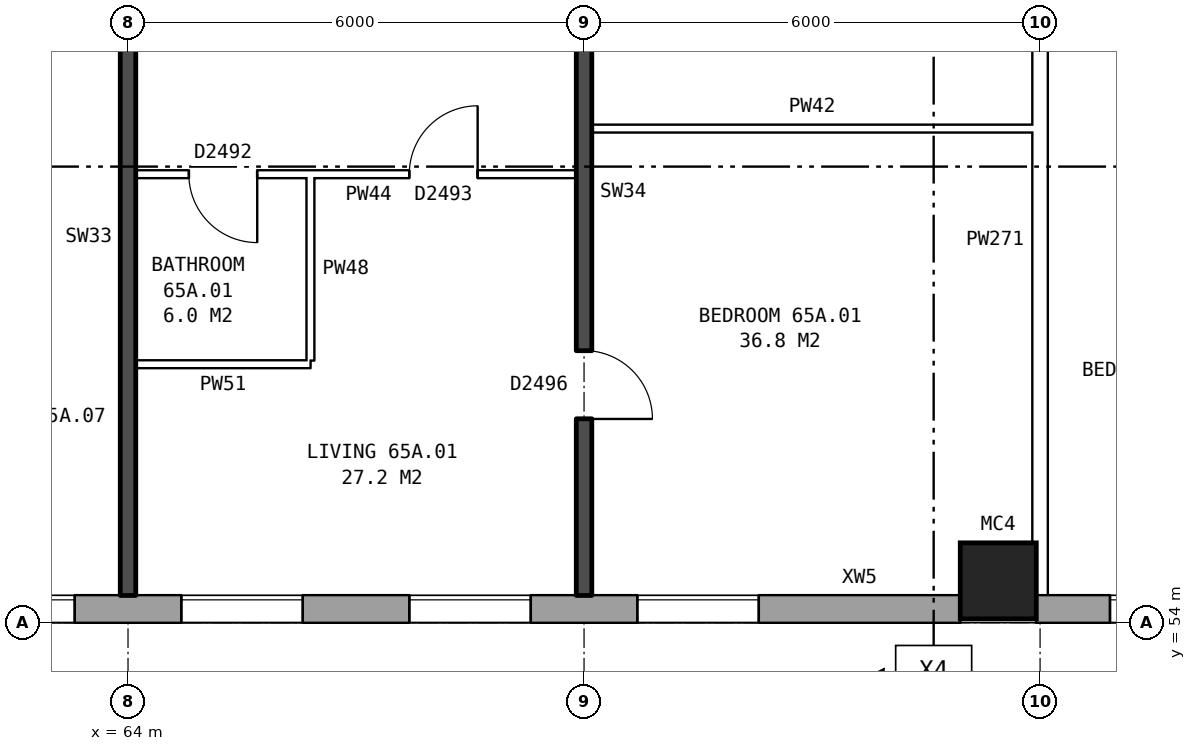
"""IFC4 building model, lengths in metres.
Left out: names, types, materials, properties, quantities, classifications, styles, units other than length and angle.
Written with IfcOpenShell. Run it as: python <this file> out.ifc"""

import sys

from ifc_helpers import new_model, si_unit, direction, frame, frame_2d, origin, origin_2d, place, context, subcontext, project, spatial, rectangle, hollow_rectangle, extrude, element, fill, save


model = new_model("IFC4")
c1 = context("Model", 3, precision=1e-05, world=origin(), true_north=direction((0.0, 1.0)))
c2 = subcontext(c1, "Body", "Model", "MODEL_VIEW")
j1 = project(units=[si_unit("LENGTHUNIT", "METRE"), si_unit("PLANEANGLEUNIT", "RADIAN")], contexts=[c1])
p1 = place(None, origin())
s1 = spatial("IfcSite", under=j1, at=p1, CompositionType="ELEMENT")
p2 = place(p1, origin())
s2 = spatial("IfcBuilding", under=s1, at=p2, CompositionType="ELEMENT")
p3 = place(p2, frame((0.0, 0.0, 230.7)))
s3 = spatial("IfcBuildingStorey", under=s2, at=p3, CompositionType="ELEMENT", Elevation=230.7)
p4 = place(p3, frame((75.45, 54.55, 0.0), z_axis=(0.0, 0.0, 1.0), x_axis=(1.0, 0.0, 0.0)))
e1 = element("IfcColumn", 1, at=p4, inside=s3, PredefinedType="COLUMN", context=c2, shape_type="SweptSolid", body=[
    extrude(hollow_rectangle(XDim=1.0, YDim=1.0, WallThickness=0.055, at=origin_2d()), origin(), (0.0, 0.0, 1.0), 3.1),
])
p5 = place(p3, frame((35.075, 54.18, 0.0), z_axis=(0.0, 0.0, 1.0), x_axis=(1.0, 0.0, 0.0)))
e2 = element("IfcWall", 2, at=p5, inside=s3, PredefinedType="STANDARD", context=c2, shape_type="SweptSolid", body=[
    extrude(rectangle(XDim=39.875, YDim=0.36, at=frame_2d((19.938, 0.0))), origin(), (0.0, 0.0, 1.0), 2.85),
])
p6 = place(p5, frame((2.625, 0.0, 0.8)))
e3 = element("IfcOpeningElement", 3, at=p6, cuts=e2, PredefinedType="OPENING", context=c2, shape_type="SweptSolid", body=[
    extrude(rectangle(XDim=1.6, YDim=1.8, at=frame_2d((0.8, 0.9))), frame((0.0, 0.19, 0.0), z_axis=(0.0, -1.0, 0.0), x_axis=(1.0, 0.0, 0.0)), (0.0, 0.0, 1.0), 0.38),
])
p7 = place(p5, frame((5.625, 0.0, 0.8)))
e4 = element("IfcOpeningElement", 4, at=p7, cuts=e2, PredefinedType="OPENING", context=c2, shape_type="SweptSolid", body=[
    extrude(rectangle(XDim=1.6, YDim=1.8, at=frame_2d((0.8, 0.9))), frame((0.0, 0.19, 0.0), z_axis=(0.0, -1.0, 0.0), x_axis=(1.0, 0.0, 0.0)), (0.0, 0.0, 1.0), 0.38),
])
p8 = place(p5, frame((8.625, 0.0, 0.8)))
e5 = element("IfcOpeningElement", 5, at=p8, cuts=e2, PredefinedType="OPENING", context=c2, shape_type="SweptSolid", body=[
    extrude(rectangle(XDim=1.6, YDim=1.8, at=frame_2d((0.8, 0.9))), frame((0.0, 0.19, 0.0), z_axis=(0.0, -1.0, 0.0), x_axis=(1.0, 0.0, 0.0)), (0.0, 0.0, 1.0), 0.38),
])
p9 = place(p5, frame((11.625, 0.0, 0.8)))
e6 = element("IfcOpeningElement", 6, at=p9, cuts=e2, PredefinedType="OPENING", context=c2, shape_type="SweptSolid", body=[
    extrude(rectangle(XDim=1.6, YDim=1.8, at=frame_2d((0.8, 0.9))), frame((0.0, 0.19, 0.0), z_axis=(0.0, -1.0, 0.0), x_axis=(1.0, 0.0, 0.0)), (0.0, 0.0, 1.0), 0.38),
])
p10 = place(p5, frame((14.075, 0.0, 0.8)))
e7 = element("IfcOpeningElement", 7, at=p10, cuts=e2, PredefinedType="OPENING", context=c2, shape_type="SweptSolid", body=[
    extrude(rectangle(XDim=1.0, YDim=1.8, at=frame_2d((0.5, 0.9))), frame((0.0, 0.19, 0.0), z_axis=(0.0, -1.0, 0.0), x_axis=(1.0, 0.0, 0.0)), (0.0, 0.0, 1.0), 0.38),
])
p11 = place(p5, frame((17.625, 0.0, 0.8)))
e8 = element("IfcOpeningElement", 8, at=p11, cuts=e2, PredefinedType="OPENING", context=c2, shape_type="SweptSolid", body=[
    extrude(rectangle(XDim=1.6, YDim=1.8, at=frame_2d((0.8, 0.9))), frame((0.0, 0.19, 0.0), z_axis=(0.0, -1.0, 0.0), x_axis=(1.0, 0.0, 0.0)), (0.0, 0.0, 1.0), 0.38),
])
p12 = place(p5, frame((20.125, 0.0, 0.8)))
e9 = element("IfcOpeningElement", 9, at=p12, cuts=e2, PredefinedType="OPENING", context=c2, shape_type="SweptSolid", body=[
    extrude(rectangle(XDim=0.6, YDim=1.2, at=frame_2d((0.3, 0.6))), frame((0.0, 0.19, 0.0), z_axis=(0.0, -1.0, 0.0), x_axis=(1.0, 0.0, 0.0)), (0.0, 0.0, 1.0), 0.38),
])
p13 = place(p5, frame((23.625, 0.0, 0.8)))
e10 = element("IfcOpeningElement", 10, at=p13, cuts=e2, PredefinedType="OPENING", context=c2, shape_type="SweptSolid", body=[
    extrude(rectangle(XDim=1.6, YDim=1.8, at=frame_2d((0.8, 0.9))), frame((0.0, 0.19, 0.0), z_axis=(0.0, -1.0, 0.0), x_axis=(1.0, 0.0, 0.0)), (0.0, 0.0, 1.0), 0.38),
])
p14 = place(p5, frame((26.625, 0.0, 0.8)))
e11 = element("IfcOpeningElement", 11, at=p14, cuts=e2, PredefinedType="OPENING", context=c2, shape_type="SweptSolid", body=[
    extrude(rectangle(XDim=1.6, YDim=1.8, at=frame_2d((0.8, 0.9))), frame((0.0, 0.19, 0.0), z_axis=(0.0, -1.0, 0.0), x_axis=(1.0, 0.0, 0.0)), (0.0, 0.0, 1.0), 0.38),
])
p15 = place(p5, frame((29.625, 0.0, 0.8)))
e12 = element("IfcOpeningElement", 12, at=p15, cuts=e2, PredefinedType="OPENING", context=c2, shape_type="SweptSolid", body=[
    extrude(rectangle(XDim=1.6, YDim=1.8, at=frame_2d((0.8, 0.9))), frame((0.0, 0.19, 0.0), z_axis=(0.0, -1.0, 0.0), x_axis=(1.0, 0.0, 0.0)), (0.0, 0.0, 1.0), 0.38),
])
p16 = place(p5, frame((32.625, 0.0, 0.8)))
e13 = element("IfcOpeningElement", 13, at=p16, cuts=e2, PredefinedType="OPENING", context=c2, shape_type="SweptSolid", body=[
    extrude(rectangle(XDim=1.6, YDim=1.8, at=frame_2d((0.8, 0.9))), frame((0.0, 0.19, 0.0), z_axis=(0.0, -1.0, 0.0), x_axis=(1.0, 0.0, 0.0)), (0.0, 0.0, 1.0), 0.38),
])
p17 = place(p5, frame((35.625, 0.0, 0.8)))
e14 = element("IfcOpeningElement", 14, at=p17, cuts=e2, PredefinedType="OPENING", context=c2, shape_type="SweptSolid", body=[
    extrude(rectangle(XDim=1.6, YDim=1.8, at=frame_2d((0.8, 0.9))), frame((0.0, 0.19, 0.0), z_axis=(0.0, -1.0, 0.0), x_axis=(1.0, 0.0, 0.0)), (0.0, 0.0, 1.0), 0.38),
])
p18 = place(p5, frame((22.125, 0.0, 1.7)))
e15 = element("IfcOpeningElement", 15, at=p18, cuts=e2, PredefinedType="OPENING", context=c2, shape_type="SweptSolid", body=[
    extrude(rectangle(XDim=0.6, YDim=0.9, at=frame_2d((0.3, 0.45))), frame((0.0, 0.19, 0.0), z_axis=(0.0, -1.0, 0.0), x_axis=(1.0, 0.0, 0.0)), (0.0, 0.0, 1.0), 0.38),
])
p19 = place(p3, frame((75.95, 54.18, 0.0), z_axis=(0.0, 0.0, 1.0), x_axis=(1.0, 0.0, 0.0)))
e16 = element("IfcWall", 16, at=p19, inside=s3, PredefinedType="STANDARD", context=c2, shape_type="SweptSolid", body=[
    extrude(rectangle(XDim=55.1, YDim=0.36, at=frame_2d((27.55, 0.0))), origin(), (0.0, 0.0, 1.0), 2.85),
])
p20 = place(p19, frame((0.969, 0.0, 0.8)))
e17 = element("IfcOpeningElement", 17, at=p20, cuts=e16, PredefinedType="OPENING", context=c2, shape_type="SweptSolid", body=[
    extrude(rectangle(XDim=1.6, YDim=1.8, at=frame_2d((0.8, 0.9))), frame((0.0, 0.19, 0.0), z_axis=(0.0, -1.0, 0.0), x_axis=(1.0, 0.0, 0.0)), (0.0, 0.0, 1.0), 0.38),
])
p21 = place(p19, frame((4.406, 0.0, 0.8)))
e18 = element("IfcOpeningElement", 18, at=p21, cuts=e16, PredefinedType="OPENING", context=c2, shape_type="SweptSolid", body=[
    extrude(rectangle(XDim=1.6, YDim=1.8, at=frame_2d((0.8, 0.9))), frame((0.0, 0.19, 0.0), z_axis=(0.0, -1.0, 0.0), x_axis=(1.0, 0.0, 0.0)), (0.0, 0.0, 1.0), 0.38),
])
p22 = place(p19, frame((7.844, 0.0, 0.8)))
e19 = element("IfcOpeningElement", 19, at=p22, cuts=e16, PredefinedType="OPENING", context=c2, shape_type="SweptSolid", body=[
    extrude(rectangle(XDim=1.6, YDim=1.8, at=frame_2d((0.8, 0.9))), frame((0.0, 0.19, 0.0), z_axis=(0.0, -1.0, 0.0), x_axis=(1.0, 0.0, 0.0)), (0.0, 0.0, 1.0), 0.38),
])
p23 = place(p19, frame((11.281, 0.0, 0.8)))
e20 = element("IfcOpeningElement", 20, at=p23, cuts=e16, PredefinedType="OPENING", context=c2, shape_type="SweptSolid", body=[
    extrude(rectangle(XDim=1.6, YDim=1.8, at=frame_2d((0.8, 0.9))), frame((0.0, 0.19, 0.0), z_axis=(0.0, -1.0, 0.0), x_axis=(1.0, 0.0, 0.0)), (0.0, 0.0, 1.0), 0.38),
])
p24 = place(p19, frame((14.719, 0.0, 0.8)))
e21 = element("IfcOpeningElement", 21, at=p24, cuts=e16, PredefinedType="OPENING", context=c2, shape_type="SweptSolid", body=[
    extrude(rectangle(XDim=1.6, YDim=1.8, at=frame_2d((0.8, 0.9))), frame((0.0, 0.19, 0.0), z_axis=(0.0, -1.0, 0.0), x_axis=(1.0, 0.0, 0.0)), (0.0, 0.0, 1.0), 0.38),
])
p25 = place(p19, frame((18.156, 0.0, 0.8)))
e22 = element("IfcOpeningElement", 22, at=p25, cuts=e16, PredefinedType="OPENING", context=c2, shape_type="SweptSolid", body=[
    extrude(rectangle(XDim=1.6, YDim=1.8, at=frame_2d((0.8, 0.9))), frame((0.0, 0.19, 0.0), z_axis=(0.0, -1.0, 0.0), x_axis=(1.0, 0.0, 0.0)), (0.0, 0.0, 1.0), 0.38),
])
p26 = place(p19, frame((21.594, 0.0, 0.8)))
e23 = element("IfcOpeningElement", 23, at=p26, cuts=e16, PredefinedType="OPENING", context=c2, shape_type="SweptSolid", body=[
    extrude(rectangle(XDim=1.6, YDim=1.8, at=frame_2d((0.8, 0.9))), frame((0.0, 0.19, 0.0), z_axis=(0.0, -1.0, 0.0), x_axis=(1.0, 0.0, 0.0)), (0.0, 0.0, 1.0), 0.38),
])
p27 = place(p19, frame((25.031, 0.0, 0.8)))
e24 = element("IfcOpeningElement", 24, at=p27, cuts=e16, PredefinedType="OPENING", context=c2, shape_type="SweptSolid", body=[
    extrude(rectangle(XDim=1.6, YDim=1.8, at=frame_2d((0.8, 0.9))), frame((0.0, 0.19, 0.0), z_axis=(0.0, -1.0, 0.0), x_axis=(1.0, 0.0, 0.0)), (0.0, 0.0, 1.0), 0.38),
])
p28 = place(p19, frame((28.469, 0.0, 0.8)))
e25 = element("IfcOpeningElement", 25, at=p28, cuts=e16, PredefinedType="OPENING", context=c2, shape_type="SweptSolid", body=[
    extrude(rectangle(XDim=1.6, YDim=1.8, at=frame_2d((0.8, 0.9))), frame((0.0, 0.19, 0.0), z_axis=(0.0, -1.0, 0.0), x_axis=(1.0, 0.0, 0.0)), (0.0, 0.0, 1.0), 0.38),
])
p29 = place(p19, frame((31.906, 0.0, 0.8)))
e26 = element("IfcOpeningElement", 26, at=p29, cuts=e16, PredefinedType="OPENING", context=c2, shape_type="SweptSolid", body=[
    extrude(rectangle(XDim=1.6, YDim=1.8, at=frame_2d((0.8, 0.9))), frame((0.0, 0.19, 0.0), z_axis=(0.0, -1.0, 0.0), x_axis=(1.0, 0.0, 0.0)), (0.0, 0.0, 1.0), 0.38),
])
p30 = place(p19, frame((35.344, 0.0, 0.8)))
e27 = element("IfcOpeningElement", 27, at=p30, cuts=e16, PredefinedType="OPENING", context=c2, shape_type="SweptSolid", body=[
    extrude(rectangle(XDim=1.6, YDim=1.8, at=frame_2d((0.8, 0.9))), frame((0.0, 0.19, 0.0), z_axis=(0.0, -1.0, 0.0), x_axis=(1.0, 0.0, 0.0)), (0.0, 0.0, 1.0), 0.38),
])
p31 = place(p19, frame((38.781, 0.0, 0.8)))
e28 = element("IfcOpeningElement", 28, at=p31, cuts=e16, PredefinedType="OPENING", context=c2, shape_type="SweptSolid", body=[
    extrude(rectangle(XDim=1.6, YDim=1.8, at=frame_2d((0.8, 0.9))), frame((0.0, 0.19, 0.0), z_axis=(0.0, -1.0, 0.0), x_axis=(1.0, 0.0, 0.0)), (0.0, 0.0, 1.0), 0.38),
])
p32 = place(p19, frame((42.219, 0.0, 0.8)))
e29 = element("IfcOpeningElement", 29, at=p32, cuts=e16, PredefinedType="OPENING", context=c2, shape_type="SweptSolid", body=[
    extrude(rectangle(XDim=1.6, YDim=1.8, at=frame_2d((0.8, 0.9))), frame((0.0, 0.19, 0.0), z_axis=(0.0, -1.0, 0.0), x_axis=(1.0, 0.0, 0.0)), (0.0, 0.0, 1.0), 0.38),
])
p33 = place(p19, frame((45.656, 0.0, 0.8)))
e30 = element("IfcOpeningElement", 30, at=p33, cuts=e16, PredefinedType="OPENING", context=c2, shape_type="SweptSolid", body=[
    extrude(rectangle(XDim=1.6, YDim=1.8, at=frame_2d((0.8, 0.9))), frame((0.0, 0.19, 0.0), z_axis=(0.0, -1.0, 0.0), x_axis=(1.0, 0.0, 0.0)), (0.0, 0.0, 1.0), 0.38),
])
p34 = place(p19, frame((49.094, 0.0, 0.8)))
e31 = element("IfcOpeningElement", 31, at=p34, cuts=e16, PredefinedType="OPENING", context=c2, shape_type="SweptSolid", body=[
    extrude(rectangle(XDim=1.6, YDim=1.8, at=frame_2d((0.8, 0.9))), frame((0.0, 0.19, 0.0), z_axis=(0.0, -1.0, 0.0), x_axis=(1.0, 0.0, 0.0)), (0.0, 0.0, 1.0), 0.38),
])
p35 = place(p19, frame((52.531, 0.0, 0.8)))
e32 = element("IfcOpeningElement", 32, at=p35, cuts=e16, PredefinedType="OPENING", context=c2, shape_type="SweptSolid", body=[
    extrude(rectangle(XDim=1.6, YDim=1.8, at=frame_2d((0.8, 0.9))), frame((0.0, 0.19, 0.0), z_axis=(0.0, -1.0, 0.0), x_axis=(1.0, 0.0, 0.0)), (0.0, 0.0, 1.0), 0.38),
])
p36 = place(p3, frame((64.1, 57.4, 0.0), z_axis=(0.0, 0.0, 1.0), x_axis=(1.0, 0.0, 0.0)))
e33 = element("IfcWall", 33, at=p36, inside=s3, PredefinedType="PARTITIONING", context=c2, shape_type="SweptSolid", body=[
    extrude(rectangle(XDim=2.3, YDim=0.1, at=frame_2d((1.15, 0.0))), origin(), (0.0, 0.0, 1.0), 2.85),
])
p37 = place(p3, frame((64.1, 59.9, 0.0), z_axis=(0.0, 0.0, 1.0), x_axis=(1.0, 0.0, 0.0)))
e34 = element("IfcWall", 34, at=p37, inside=s3, PredefinedType="PARTITIONING", context=c2, shape_type="SweptSolid", body=[
    extrude(rectangle(XDim=5.8, YDim=0.1, at=frame_2d((2.9, 0.0))), origin(), (0.0, 0.0, 1.0), 2.85),
])
p38 = place(p37, frame((3.6, 0.0, 0.0)))
e35 = element("IfcOpeningElement", 35, at=p38, cuts=e34, PredefinedType="OPENING", context=c2, shape_type="SweptSolid", body=[
    extrude(rectangle(XDim=0.9, YDim=2.1, at=frame_2d((0.45, 1.05))), frame((0.0, 0.06, 0.0), z_axis=(0.0, -1.0, 0.0), x_axis=(1.0, 0.0, 0.0)), (0.0, 0.0, 1.0), 0.12),
])
p39 = place(p37, frame((0.7, 0.0, 0.0)))
e36 = element("IfcOpeningElement", 36, at=p39, cuts=e34, PredefinedType="OPENING", context=c2, shape_type="SweptSolid", body=[
    extrude(rectangle(XDim=0.9, YDim=2.1, at=frame_2d((0.45, 1.05))), frame((0.0, 0.06, 0.0), z_axis=(0.0, -1.0, 0.0), x_axis=(1.0, 0.0, 0.0)), (0.0, 0.0, 1.0), 0.12),
])
p40 = place(p3, frame((70.1, 60.5, 0.0), z_axis=(0.0, 0.0, 1.0), x_axis=(1.0, 0.0, 0.0)))
e37 = element("IfcWall", 37, at=p40, inside=s3, PredefinedType="PARTITIONING", context=c2, shape_type="SweptSolid", body=[
    extrude(rectangle(XDim=5.8, YDim=0.1, at=frame_2d((2.9, 0.0))), origin(), (0.0, 0.0, 1.0), 2.85),
])
p41 = place(p3, frame((64.0, 54.36, 0.0), z_axis=(0.0, 0.0, 1.0), x_axis=(0.0, 1.0, 0.0)))
e38 = element("IfcWall", 38, at=p41, inside=s3, PredefinedType="SOLIDWALL", context=c2, shape_type="SweptSolid", body=[
    extrude(rectangle(XDim=9.44, YDim=0.2, at=frame_2d((4.72, 0.0))), origin(), (0.0, 0.0, 1.0), 2.85),
])
p42 = place(p3, frame((66.4, 57.45, 0.0), z_axis=(0.0, 0.0, 1.0), x_axis=(0.0, 1.0, 0.0)))
e39 = element("IfcWall", 39, at=p42, inside=s3, PredefinedType="PARTITIONING", context=c2, shape_type="SweptSolid", body=[
    extrude(rectangle(XDim=2.4, YDim=0.1, at=frame_2d((1.2, 0.0))), origin(), (0.0, 0.0, 1.0), 2.85),
])
p43 = place(p3, frame((70.0, 54.36, 0.0), z_axis=(0.0, 0.0, 1.0), x_axis=(0.0, 1.0, 0.0)))
e40 = element("IfcWall", 40, at=p43, inside=s3, PredefinedType="SOLIDWALL", context=c2, shape_type="SweptSolid", body=[
    extrude(rectangle(XDim=9.44, YDim=0.2, at=frame_2d((4.72, 0.0))), origin(), (0.0, 0.0, 1.0), 2.85),
])
p44 = place(p43, frame((2.32, 0.0, 0.0)))
e41 = element("IfcOpeningElement", 41, at=p44, cuts=e40, PredefinedType="OPENING", context=c2, shape_type="SweptSolid", body=[
    extrude(rectangle(XDim=0.9, YDim=2.1, at=frame_2d((0.45, 1.05))), frame((0.0, 0.11, 0.0), z_axis=(0.0, -1.0, 0.0), x_axis=(1.0, 0.0, 0.0)), (0.0, 0.0, 1.0), 0.22),
])
p45 = place(p43, frame((7.39, 0.0, 0.0)))
e42 = element("IfcOpeningElement", 42, at=p45, cuts=e40, PredefinedType="OPENING", context=c2, shape_type="SweptSolid", body=[
    extrude(rectangle(XDim=0.8, YDim=2.1, at=frame_2d((0.4, 1.05))), frame((0.0, 0.11, 0.0), z_axis=(0.0, -1.0, 0.0), x_axis=(1.0, 0.0, 0.0)), (0.0, 0.0, 1.0), 0.22),
])
p46 = place(p3, frame((76.0, 54.36, 0.0), z_axis=(0.0, 0.0, 1.0), x_axis=(0.0, 1.0, 0.0)))
e43 = element("IfcWall", 43, at=p46, inside=s3, PredefinedType="PARTITIONING", context=c2, shape_type="SweptSolid", body=[
    extrude(rectangle(XDim=9.34, YDim=0.2, at=frame_2d((4.67, 0.0))), origin(), (0.0, 0.0, 1.0), 2.85),
])
p47 = place(p14, origin())
e44 = element("IfcWindow", 44, at=p47, inside=s3, PartitioningType="SINGLE_PANEL", PredefinedType="WINDOW", context=c2, shape_type="SweptSolid", body=[
    extrude(rectangle(XDim=1.6, YDim=1.8, at=frame_2d((0.8, 0.9))), frame((0.0, 0.15, 0.0), z_axis=(0.0, -1.0, 0.0), x_axis=(1.0, 0.0, 0.0)), (0.0, 0.0, 1.0), 0.06),
])
fill(e11, e44)
p48 = place(p15, origin())
e45 = element("IfcWindow", 45, at=p48, inside=s3, PartitioningType="SINGLE_PANEL", PredefinedType="WINDOW", context=c2, shape_type="SweptSolid", body=[
    extrude(rectangle(XDim=1.6, YDim=1.8, at=frame_2d((0.8, 0.9))), frame((0.0, 0.15, 0.0), z_axis=(0.0, -1.0, 0.0), x_axis=(1.0, 0.0, 0.0)), (0.0, 0.0, 1.0), 0.06),
])
fill(e12, e45)
p49 = place(p16, origin())
e46 = element("IfcWindow", 46, at=p49, inside=s3, PartitioningType="SINGLE_PANEL", PredefinedType="WINDOW", context=c2, shape_type="SweptSolid", body=[
    extrude(rectangle(XDim=1.6, YDim=1.8, at=frame_2d((0.8, 0.9))), frame((0.0, 0.15, 0.0), z_axis=(0.0, -1.0, 0.0), x_axis=(1.0, 0.0, 0.0)), (0.0, 0.0, 1.0), 0.06),
])
fill(e13, e46)
p50 = place(p17, origin())
e47 = element("IfcWindow", 47, at=p50, inside=s3, PartitioningType="SINGLE_PANEL", PredefinedType="WINDOW", context=c2, shape_type="SweptSolid", body=[
    extrude(rectangle(XDim=1.6, YDim=1.8, at=frame_2d((0.8, 0.9))), frame((0.0, 0.15, 0.0), z_axis=(0.0, -1.0, 0.0), x_axis=(1.0, 0.0, 0.0)), (0.0, 0.0, 1.0), 0.06),
])
fill(e14, e47)
p51 = place(p20, origin())
e48 = element("IfcWindow", 48, at=p51, inside=s3, PartitioningType="SINGLE_PANEL", PredefinedType="WINDOW", context=c2, shape_type="SweptSolid", body=[
    extrude(rectangle(XDim=1.6, YDim=1.8, at=frame_2d((0.8, 0.9))), frame((0.0, 0.15, 0.0), z_axis=(0.0, -1.0, 0.0), x_axis=(1.0, 0.0, 0.0)), (0.0, 0.0, 1.0), 0.06),
])
fill(e17, e48)
p52 = place(p44, frame((0.9, 0.0, 0.0), z_axis=(0.0, 0.0, 1.0), x_axis=(-1.0, 0.0, 0.0)))
e49 = element("IfcDoor", 49, at=p52, inside=s3, OperationType="SINGLE_SWING_RIGHT", PredefinedType="DOOR", context=c2, shape_type="SweptSolid", body=[
    extrude(rectangle(XDim=0.9, YDim=2.1, at=frame_2d((0.45, 1.05))), frame((0.0, 0.025, 0.0), z_axis=(0.0, -1.0, 0.0), x_axis=(1.0, 0.0, 0.0)), (0.0, 0.0, 1.0), 0.05),
])
fill(e41, e49)
p53 = place(p38, origin())
e50 = element("IfcDoor", 50, at=p53, inside=s3, OperationType="SINGLE_SWING_RIGHT", PredefinedType="DOOR", context=c2, shape_type="SweptSolid", body=[
    extrude(rectangle(XDim=0.9, YDim=2.1, at=frame_2d((0.45, 1.05))), frame((0.0, 0.025, 0.0), z_axis=(0.0, -1.0, 0.0), x_axis=(1.0, 0.0, 0.0)), (0.0, 0.0, 1.0), 0.05),
])
fill(e35, e50)
p54 = place(p39, frame((0.9, 0.0, 0.0), z_axis=(0.0, 0.0, 1.0), x_axis=(-1.0, 0.0, 0.0)))
e51 = element("IfcDoor", 51, at=p54, inside=s3, OperationType="SINGLE_SWING_LEFT", PredefinedType="DOOR", context=c2, shape_type="SweptSolid", body=[
    extrude(rectangle(XDim=0.9, YDim=2.1, at=frame_2d((0.45, 1.05))), frame((0.0, 0.025, 0.0), z_axis=(0.0, -1.0, 0.0), x_axis=(1.0, 0.0, 0.0)), (0.0, 0.0, 1.0), 0.05),
])
fill(e36, e51)
save(model, sys.argv[1])
